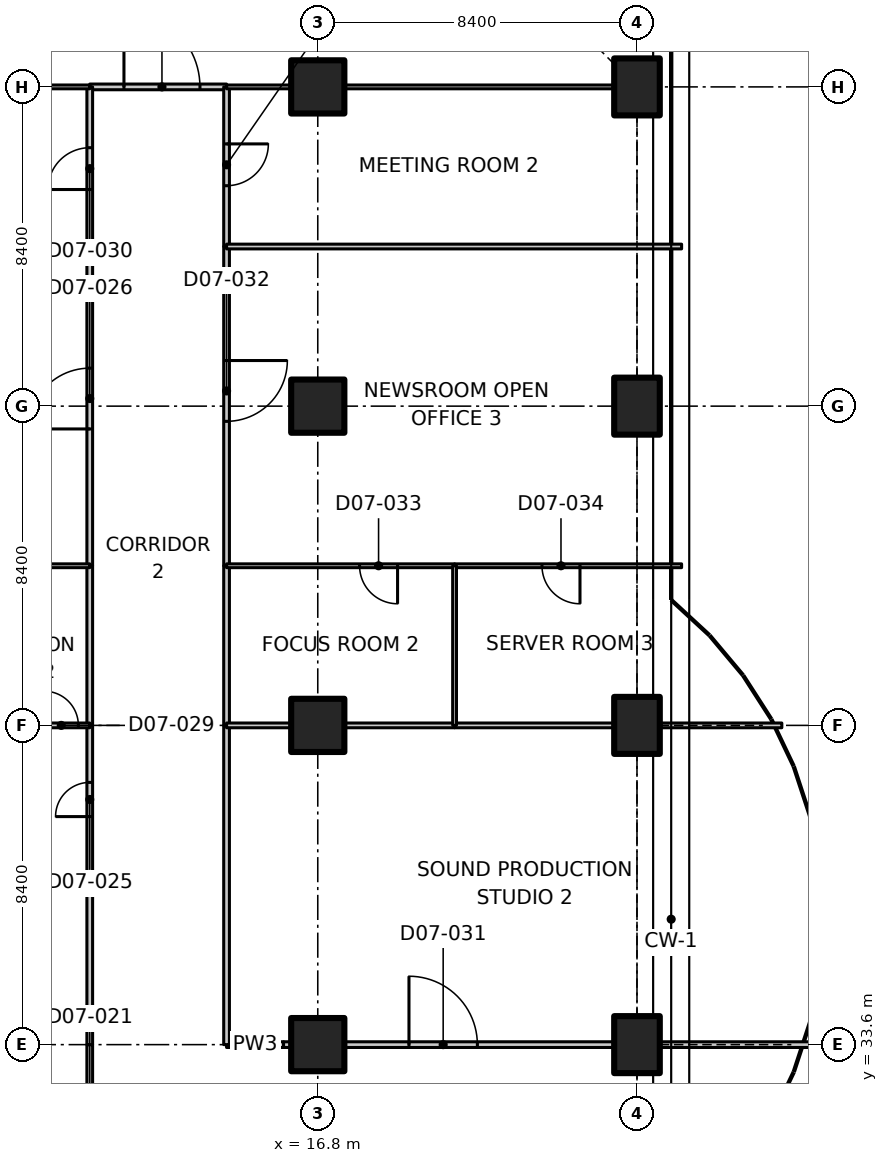
"""IFC4 building model, lengths in metres.
Left out: names, types, materials, properties, quantities, classifications, styles, units other than length and angle.
Written with IfcOpenShell. Run it as: python <this file> out.ifc"""

import sys

from ifc_helpers import new_model, si_unit, direction, frame, frame_2d, origin, origin_2d, place, context, subcontext, project, spatial, polyline, rectangle, outline, extrude, element, fill, save


model = new_model("IFC4")
c1 = context("Model", 3, precision=1e-05, world=origin(), true_north=direction((0.0, 1.0)))
c2 = subcontext(c1, "Body", "Model", "MODEL_VIEW")
j1 = project(units=[si_unit("LENGTHUNIT", "METRE"), si_unit("PLANEANGLEUNIT", "RADIAN")], contexts=[c1])
p1 = place(None, origin())
s1 = spatial("IfcSite", under=j1, at=p1, CompositionType="ELEMENT")
p2 = place(p1, origin())
s2 = spatial("IfcBuilding", under=s1, at=p2, CompositionType="ELEMENT")
p3 = place(p2, frame((0.0, 0.0, 43.7)))
s3 = spatial("IfcBuildingStorey", under=s2, at=p3, CompositionType="ELEMENT", Elevation=43.7)
for number, where, z_axis, x_axis in (
    (1, (16.8, 33.6, 0.0), (0.0, 0.0, 1.0), (1.0, 0.0, 0.0)),
    (2, (16.8, 42.0, 0.0), (0.0, 0.0, 1.0), (1.0, 0.0, 0.0)),
    (3, (16.8, 50.4, 0.0), (0.0, 0.0, 1.0), (1.0, 0.0, 0.0)),
    (4, (16.8, 58.8, 0.0), (0.0, 0.0, 1.0), (1.0, 0.0, 0.0)),
):
    element("IfcColumn", number, at=place(p3, frame(where, z_axis=z_axis, x_axis=x_axis)), inside=s3, PredefinedType="COLUMN", context=c2, shape_type="SweptSolid", body=[
        extrude(rectangle(XDim=1.4, YDim=1.4, at=origin_2d()), origin(), (0.0, 0.0, 1.0), 3.35),
    ])
for number, where, z_axis, x_axis in (
    (5, (25.2, 33.6, 0.0), (0.0, 0.0, 1.0), (1.0, 0.0, 0.0)),
    (6, (25.2, 42.0, 0.0), (0.0, 0.0, 1.0), (1.0, 0.0, 0.0)),
    (7, (25.2, 50.4, 0.0), (0.0, 0.0, 1.0), (1.0, 0.0, 0.0)),
    (8, (25.2, 58.8, 0.0), (0.0, 0.0, 1.0), (1.0, 0.0, 0.0)),
):
    element("IfcColumn", number, at=place(p3, frame(where, z_axis=z_axis, x_axis=x_axis)), inside=s3, PredefinedType="COLUMN", context=c2, shape_type="SweptSolid", body=[
        extrude(rectangle(XDim=1.2, YDim=1.5, at=origin_2d()), origin(), (0.0, 0.0, 1.0), 3.35),
    ])
p4 = place(p3, frame((10.8, 29.4, 0.0), z_axis=(0.0, 0.0, 1.0), x_axis=(0.0, 1.0, 0.0)))
e9 = element("IfcWall", 9, at=p4, inside=s3, PredefinedType="PARTITIONING", context=c2, shape_type="SweptSolid", body=[
    extrude(rectangle(XDim=4.2, YDim=0.15, at=frame_2d((2.1, 0.0))), origin(), (0.0, 0.0, 1.0), 3.33),
])
p5 = place(p4, frame((1.2, 0.0, 0.0)))
e10 = element("IfcOpeningElement", 10, at=p5, cuts=e9, PredefinedType="OPENING", context=c2, shape_type="SweptSolid", body=[
    extrude(rectangle(XDim=1.6, YDim=2.1, at=frame_2d((0.8, 1.05))), frame((0.0, 0.085, 0.0), z_axis=(0.0, -1.0, 0.0), x_axis=(1.0, 0.0, 0.0)), (0.0, 0.0, 1.0), 0.17),
])
p6 = place(p3, frame((14.4, 33.6, 0.0), z_axis=(0.0, 0.0, 1.0), x_axis=(1.0, 0.0, 0.0)))
e11 = element("IfcWall", 11, at=p6, inside=s3, PredefinedType="PARTITIONING", context=c2, shape_type="SweptSolid", body=[
    extrude(rectangle(XDim=1.5, YDim=0.15, at=frame_2d((0.75, 0.0))), origin(), (0.0, 0.0, 1.0), 3.33),
])
p7 = place(p3, frame((15.9, 33.6, 0.0), z_axis=(0.0, 0.0, 1.0), x_axis=(1.0, 0.0, 0.0)))
e12 = element("IfcWall", 12, at=p7, inside=s3, PredefinedType="PARTITIONING", context=c2, shape_type="SweptSolid", body=[
    extrude(rectangle(XDim=8.68, YDim=0.15, at=frame_2d((4.34, 0.0))), origin(), (0.0, 0.0, 1.0), 3.33),
])
p8 = place(p7, frame((3.3, 0.0, 0.0)))
e13 = element("IfcOpeningElement", 13, at=p8, cuts=e12, PredefinedType="OPENING", context=c2, shape_type="SweptSolid", body=[
    extrude(rectangle(XDim=1.8, YDim=2.1, at=frame_2d((0.9, 1.05))), frame((0.0, 0.085, 0.0), z_axis=(0.0, -1.0, 0.0), x_axis=(1.0, 0.0, 0.0)), (0.0, 0.0, 1.0), 0.17),
])
p9 = place(p3, frame((25.82, 33.6, 0.0), z_axis=(0.0, 0.0, 1.0), x_axis=(1.0, 0.0, 0.0)))
e14 = element("IfcWall", 14, at=p9, inside=s3, PredefinedType="PARTITIONING", context=c2, shape_type="SweptSolid", body=[
    extrude(rectangle(XDim=3.942, YDim=0.15, at=frame_2d((1.971, 0.0))), origin(), (0.0, 0.0, 1.0), 2.98),
])
p10 = place(p3, frame((10.8, 58.8, 0.0), z_axis=(0.0, 0.0, 1.0), x_axis=(1.0, 0.0, 0.0)))
e15 = element("IfcWall", 15, at=p10, inside=s3, PredefinedType="PARTITIONING", context=c2, shape_type="SweptSolid", body=[
    extrude(rectangle(XDim=3.6, YDim=0.15, at=frame_2d((1.8, 0.0))), origin(), (0.0, 0.0, 1.0), 3.33),
])
p11 = place(p10, frame((0.9, 0.0, 0.0)))
e16 = element("IfcOpeningElement", 16, at=p11, cuts=e15, PredefinedType="OPENING", context=c2, shape_type="SweptSolid", body=[
    extrude(rectangle(XDim=2.0, YDim=2.4, at=frame_2d((1.0, 1.2))), frame((0.0, 0.085, 0.0), z_axis=(0.0, -1.0, 0.0), x_axis=(1.0, 0.0, 0.0)), (0.0, 0.0, 1.0), 0.17),
])
p12 = place(p3, frame((10.8, 33.6, 0.0), z_axis=(0.0, 0.0, 1.0), x_axis=(0.0, 1.0, 0.0)))
e17 = element("IfcWall", 17, at=p12, inside=s3, PredefinedType="PARTITIONING", context=c2, shape_type="SweptSolid", body=[
    extrude(rectangle(XDim=4.2, YDim=0.15, at=frame_2d((2.1, 0.0))), origin(), (0.0, 0.0, 1.0), 3.33),
])
p13 = place(p3, frame((10.8, 37.8, 0.0), z_axis=(0.0, 0.0, 1.0), x_axis=(0.0, 1.0, 0.0)))
e18 = element("IfcWall", 18, at=p13, inside=s3, PredefinedType="PARTITIONING", context=c2, shape_type="SweptSolid", body=[
    extrude(rectangle(XDim=4.2, YDim=0.15, at=frame_2d((2.1, 0.0))), origin(), (0.0, 0.0, 1.0), 3.33),
])
p14 = place(p13, frame((1.8, 0.0, 0.0)))
e19 = element("IfcOpeningElement", 19, at=p14, cuts=e18, PredefinedType="OPENING", context=c2, shape_type="SweptSolid", body=[
    extrude(rectangle(XDim=0.9, YDim=2.1, at=frame_2d((0.45, 1.05))), frame((0.0, 0.085, 0.0), z_axis=(0.0, -1.0, 0.0), x_axis=(1.0, 0.0, 0.0)), (0.0, 0.0, 1.0), 0.17),
])
p15 = place(p3, frame((10.8, 46.2, 0.0), z_axis=(0.0, 0.0, 1.0), x_axis=(0.0, 1.0, 0.0)))
e20 = element("IfcWall", 20, at=p15, inside=s3, PredefinedType="PARTITIONING", context=c2, shape_type="SweptSolid", body=[
    extrude(rectangle(XDim=8.4, YDim=0.15, at=frame_2d((4.2, 0.0))), origin(), (0.0, 0.0, 1.0), 3.33),
])
p16 = place(p15, frame((3.6, 0.0, 0.0)))
e21 = element("IfcOpeningElement", 21, at=p16, cuts=e20, PredefinedType="OPENING", context=c2, shape_type="SweptSolid", body=[
    extrude(rectangle(XDim=1.6, YDim=2.1, at=frame_2d((0.8, 1.05))), frame((0.0, 0.085, 0.0), z_axis=(0.0, -1.0, 0.0), x_axis=(1.0, 0.0, 0.0)), (0.0, 0.0, 1.0), 0.17),
])
p17 = place(p3, frame((10.8, 42.0, 0.0), z_axis=(0.0, 0.0, 1.0), x_axis=(0.0, 1.0, 0.0)))
e22 = element("IfcWall", 22, at=p17, inside=s3, PredefinedType="PARTITIONING", context=c2, shape_type="SweptSolid", body=[
    extrude(rectangle(XDim=4.2, YDim=0.15, at=frame_2d((2.1, 0.0))), origin(), (0.0, 0.0, 1.0), 3.33),
])
p18 = place(p3, frame((10.8, 54.6, 0.0), z_axis=(0.0, 0.0, 1.0), x_axis=(0.0, 1.0, 0.0)))
e23 = element("IfcWall", 23, at=p18, inside=s3, PredefinedType="PARTITIONING", context=c2, shape_type="SweptSolid", body=[
    extrude(rectangle(XDim=4.2, YDim=0.15, at=frame_2d((2.1, 0.0))), origin(), (0.0, 0.0, 1.0), 3.33),
])
p19 = place(p18, frame((1.5, 0.0, 0.0)))
e24 = element("IfcOpeningElement", 24, at=p19, cuts=e23, PredefinedType="OPENING", context=c2, shape_type="SweptSolid", body=[
    extrude(rectangle(XDim=1.1, YDim=2.1, at=frame_2d((0.55, 1.05))), frame((0.0, 0.085, 0.0), z_axis=(0.0, -1.0, 0.0), x_axis=(1.0, 0.0, 0.0)), (0.0, 0.0, 1.0), 0.17),
])
p20 = place(p3, frame((14.4, 42.0, 0.0), z_axis=(0.0, 0.0, 1.0), x_axis=(0.0, -1.0, 0.0)))
e25 = element("IfcWall", 25, at=p20, inside=s3, PredefinedType="PARTITIONING", context=c2, shape_type="SweptSolid", body=[
    extrude(rectangle(XDim=8.4, YDim=0.15, at=frame_2d((4.2, 0.0))), origin(), (0.0, 0.0, 1.0), 3.33),
])
p21 = place(p3, frame((14.4, 54.6, 0.0), z_axis=(0.0, 0.0, 1.0), x_axis=(0.0, -1.0, 0.0)))
e26 = element("IfcWall", 26, at=p21, inside=s3, PredefinedType="PARTITIONING", context=c2, shape_type="SweptSolid", body=[
    extrude(rectangle(XDim=8.4, YDim=0.15, at=frame_2d((4.2, 0.0))), origin(), (0.0, 0.0, 1.0), 3.33),
])
p22 = place(p21, frame((3.0, 0.0, 0.0)))
e27 = element("IfcOpeningElement", 27, at=p22, cuts=e26, PredefinedType="OPENING", context=c2, shape_type="SweptSolid", body=[
    extrude(rectangle(XDim=1.6, YDim=2.1, at=frame_2d((0.8, 1.05))), frame((0.0, 0.085, 0.0), z_axis=(0.0, -1.0, 0.0), x_axis=(1.0, 0.0, 0.0)), (0.0, 0.0, 1.0), 0.17),
])
p23 = place(p3, frame((14.4, 46.2, 0.0), z_axis=(0.0, 0.0, 1.0), x_axis=(0.0, -1.0, 0.0)))
e28 = element("IfcWall", 28, at=p23, inside=s3, PredefinedType="PARTITIONING", context=c2, shape_type="SweptSolid", body=[
    extrude(rectangle(XDim=4.2, YDim=0.15, at=frame_2d((2.1, 0.0))), origin(), (0.0, 0.0, 1.0), 3.33),
])
p24 = place(p3, frame((14.4, 58.8, 0.0), z_axis=(0.0, 0.0, 1.0), x_axis=(0.0, -1.0, 0.0)))
e29 = element("IfcWall", 29, at=p24, inside=s3, PredefinedType="PARTITIONING", context=c2, shape_type="SweptSolid", body=[
    extrude(rectangle(XDim=4.2, YDim=0.15, at=frame_2d((2.1, 0.0))), origin(), (0.0, 0.0, 1.0), 3.33),
])
p25 = place(p24, frame((1.5, 0.0, 0.0)))
e30 = element("IfcOpeningElement", 30, at=p25, cuts=e29, PredefinedType="OPENING", context=c2, shape_type="SweptSolid", body=[
    extrude(rectangle(XDim=1.1, YDim=2.1, at=frame_2d((0.55, 1.05))), frame((0.0, 0.085, 0.0), z_axis=(0.0, -1.0, 0.0), x_axis=(1.0, 0.0, 0.0)), (0.0, 0.0, 1.0), 0.17),
])
p26 = place(p3, frame((10.8, 58.8, 0.0), z_axis=(0.0, 0.0, 1.0), x_axis=(-1.0, 0.0, 0.0)))
e31 = element("IfcWall", 31, at=p26, inside=s3, PredefinedType="PARTITIONING", context=c2, shape_type="SweptSolid", body=[
    extrude(rectangle(XDim=1.68, YDim=0.1, at=frame_2d((0.84, 0.0))), origin(), (0.0, 0.0, 1.0), 3.33),
])
p27 = place(p3, frame((24.58, 58.8, 0.0), z_axis=(0.0, 0.0, 1.0), x_axis=(-1.0, 0.0, 0.0)))
e32 = element("IfcWall", 32, at=p27, inside=s3, PredefinedType="PARTITIONING", context=c2, shape_type="SweptSolid", body=[
    extrude(rectangle(XDim=7.06, YDim=0.1, at=frame_2d((3.53, 0.0))), origin(), (0.0, 0.0, 1.0), 3.33),
])
p28 = place(p3, frame((16.08, 58.8, 0.0), z_axis=(0.0, 0.0, 1.0), x_axis=(-1.0, 0.0, 0.0)))
e33 = element("IfcWall", 33, at=p28, inside=s3, PredefinedType="PARTITIONING", context=c2, shape_type="SweptSolid", body=[
    extrude(rectangle(XDim=1.68, YDim=0.1, at=frame_2d((0.84, 0.0))), origin(), (0.0, 0.0, 1.0), 3.33),
])
p29 = place(p3, frame((-1.174, 37.8, 0.0), z_axis=(0.0, 0.0, 1.0), x_axis=(1.0, 0.0, 0.0)))
e34 = element("IfcWall", 34, at=p29, inside=s3, PredefinedType="PARTITIONING", context=c2, shape_type="SweptSolid", body=[
    extrude(outline(polyline([(0.0, 0.0), (11.974, 0.0), (11.974, 3.33), (1.624, 3.33), (1.622, 2.98), (0.726, 2.98), (0.724, 3.33), (0.074, 3.33), (0.0, 3.33), (0.0, 0.0)])), frame((0.0, 0.062, 0.0), z_axis=(0.0, -1.0, 0.0), x_axis=(1.0, 0.0, 0.0)), (0.0, 0.0, 1.0), 0.125),
])
p30 = place(p3, frame((6.6, 42.0, 0.0), z_axis=(0.0, 0.0, 1.0), x_axis=(1.0, 0.0, 0.0)))
e35 = element("IfcWall", 35, at=p30, inside=s3, PredefinedType="PARTITIONING", context=c2, shape_type="SweptSolid", body=[
    extrude(rectangle(XDim=4.2, YDim=0.125, at=frame_2d((2.1, 0.0))), origin(), (0.0, 0.0, 1.0), 3.33),
])
p31 = place(p30, frame((3.0, 0.0, 0.0)))
e36 = element("IfcOpeningElement", 36, at=p31, cuts=e35, PredefinedType="OPENING", context=c2, shape_type="SweptSolid", body=[
    extrude(rectangle(XDim=0.9, YDim=2.1, at=frame_2d((0.45, 1.05))), frame((0.0, 0.073, 0.0), z_axis=(0.0, -1.0, 0.0), x_axis=(1.0, 0.0, 0.0)), (0.0, 0.0, 1.0), 0.145),
])
p32 = place(p3, frame((10.8, 46.2, 0.0), z_axis=(0.0, 0.0, 1.0), x_axis=(-1.0, 0.0, 0.0)))
e37 = element("IfcWall", 37, at=p32, inside=s3, PredefinedType="PARTITIONING", context=c2, shape_type="SweptSolid", body=[
    extrude(rectangle(XDim=4.2, YDim=0.1, at=frame_2d((2.1, 0.0))), origin(), (0.0, 0.0, 1.0), 3.33),
])
p33 = place(p3, frame((-1.174, 54.6, 0.0), z_axis=(0.0, 0.0, 1.0), x_axis=(1.0, 0.0, 0.0)))
e38 = element("IfcWall", 38, at=p33, inside=s3, PredefinedType="PARTITIONING", context=c2, shape_type="SweptSolid", body=[
    extrude(outline(polyline([(0.0, 0.0), (11.974, 0.0), (11.974, 3.33), (1.624, 3.33), (1.622, 2.98), (0.726, 2.98), (0.724, 3.33), (0.074, 3.33), (0.0, 3.33), (0.0, 0.0)])), frame((0.0, 0.062, 0.0), z_axis=(0.0, -1.0, 0.0), x_axis=(1.0, 0.0, 0.0)), (0.0, 0.0, 1.0), 0.125),
])
p34 = place(p3, frame((14.4, 42.0, 0.0), z_axis=(0.0, 0.0, 1.0), x_axis=(1.0, 0.0, 0.0)))
e39 = element("IfcWall", 39, at=p34, inside=s3, PredefinedType="PARTITIONING", context=c2, shape_type="SweptSolid", body=[
    extrude(rectangle(XDim=6.0, YDim=0.125, at=frame_2d((3.0, 0.0))), origin(), (0.0, 0.0, 1.0), 3.33),
])
p35 = place(p3, frame((20.4, 42.0, 0.0), z_axis=(0.0, 0.0, 1.0), x_axis=(1.0, 0.0, 0.0)))
e40 = element("IfcWall", 40, at=p35, inside=s3, PredefinedType="PARTITIONING", context=c2, shape_type="SweptSolid", body=[
    extrude(rectangle(XDim=4.18, YDim=0.125, at=frame_2d((2.09, 0.0))), origin(), (0.0, 0.0, 1.0), 3.33),
])
p36 = place(p3, frame((25.82, 42.0, 0.0), z_axis=(0.0, 0.0, 1.0), x_axis=(1.0, 0.0, 0.0)))
e41 = element("IfcWall", 41, at=p36, inside=s3, PredefinedType="PARTITIONING", context=c2, shape_type="SweptSolid", body=[
    extrude(rectangle(XDim=3.191, YDim=0.125, at=frame_2d((1.596, 0.0))), origin(), (0.0, 0.0, 1.0), 2.98),
])
p37 = place(p3, frame((20.4, 46.2, 0.0), z_axis=(0.0, 0.0, 1.0), x_axis=(-1.0, 0.0, 0.0)))
e42 = element("IfcWall", 42, at=p37, inside=s3, PredefinedType="PARTITIONING", context=c2, shape_type="SweptSolid", body=[
    extrude(rectangle(XDim=6.0, YDim=0.1, at=frame_2d((3.0, 0.0))), origin(), (0.0, 0.0, 1.0), 3.33),
])
p38 = place(p37, frame((1.5, 0.0, 0.0)))
e43 = element("IfcOpeningElement", 43, at=p38, cuts=e42, PredefinedType="OPENING", context=c2, shape_type="SweptSolid", body=[
    extrude(rectangle(XDim=1.0, YDim=2.1, at=frame_2d((0.5, 1.05))), frame((0.0, 0.06, 0.0), z_axis=(0.0, -1.0, 0.0), x_axis=(1.0, 0.0, 0.0)), (0.0, 0.0, 1.0), 0.12),
])
p39 = place(p3, frame((26.374, 46.2, 0.0), z_axis=(0.0, 0.0, 1.0), x_axis=(-1.0, 0.0, 0.0)))
e44 = element("IfcWall", 44, at=p39, inside=s3, PredefinedType="PARTITIONING", context=c2, shape_type="SweptSolid", body=[
    extrude(outline(polyline([(0.0, 0.0), (5.974, 0.0), (5.974, 3.33), (1.624, 3.33), (1.622, 2.98), (0.726, 2.98), (0.724, 3.33), (0.074, 3.33), (0.0, 3.33), (0.0, 0.0)])), frame((0.0, 0.05, 0.0), z_axis=(0.0, -1.0, 0.0), x_axis=(1.0, 0.0, 0.0)), (0.0, 0.0, 1.0), 0.1),
])
p40 = place(p39, frame((2.674, 0.0, 0.0)))
e45 = element("IfcOpeningElement", 45, at=p40, cuts=e44, PredefinedType="OPENING", context=c2, shape_type="SweptSolid", body=[
    extrude(rectangle(XDim=1.0, YDim=2.1, at=frame_2d((0.5, 1.05))), frame((0.0, 0.06, 0.0), z_axis=(0.0, -1.0, 0.0), x_axis=(1.0, 0.0, 0.0)), (0.0, 0.0, 1.0), 0.12),
])
p41 = place(p3, frame((14.4, 54.6, 0.0), z_axis=(0.0, 0.0, 1.0), x_axis=(1.0, 0.0, 0.0)))
e46 = element("IfcWall", 46, at=p41, inside=s3, PredefinedType="PARTITIONING", context=c2, shape_type="SweptSolid", body=[
    extrude(outline(polyline([(0.0, 0.0), (11.974, 0.0), (11.974, 3.33), (11.9, 3.33), (11.25, 3.33), (11.248, 2.98), (10.352, 2.98), (10.35, 3.33), (0.0, 3.33), (0.0, 0.0)])), frame((0.0, 0.062, 0.0), z_axis=(0.0, -1.0, 0.0), x_axis=(1.0, 0.0, 0.0)), (0.0, 0.0, 1.0), 0.125),
])
p42 = place(p3, frame((20.4, 46.2, 0.0), z_axis=(0.0, 0.0, 1.0), x_axis=(0.0, -1.0, 0.0)))
e47 = element("IfcWall", 47, at=p42, inside=s3, PredefinedType="PARTITIONING", context=c2, shape_type="SweptSolid", body=[
    extrude(rectangle(XDim=4.2, YDim=0.1, at=frame_2d((2.1, 0.0))), origin(), (0.0, 0.0, 1.0), 3.33),
])
p43 = place(p11, origin())
e48 = element("IfcDoor", 48, at=p43, inside=s3, OperationType="DOUBLE_DOOR_SINGLE_SWING", PredefinedType="DOOR", context=c2, shape_type="SweptSolid", body=[
    extrude(rectangle(XDim=2.0, YDim=2.4, at=frame_2d((1.0, 1.2))), frame((0.0, 0.025, 0.0), z_axis=(0.0, -1.0, 0.0), x_axis=(1.0, 0.0, 0.0)), (0.0, 0.0, 1.0), 0.05),
])
fill(e16, e48)
p44 = place(p14, origin())
e49 = element("IfcDoor", 49, at=p44, inside=s3, OperationType="SINGLE_SWING_LEFT", PredefinedType="DOOR", context=c2, shape_type="SweptSolid", body=[
    extrude(rectangle(XDim=0.9, YDim=2.1, at=frame_2d((0.45, 1.05))), frame((0.0, 0.025, 0.0), z_axis=(0.0, -1.0, 0.0), x_axis=(1.0, 0.0, 0.0)), (0.0, 0.0, 1.0), 0.05),
])
fill(e19, e49)
p45 = place(p16, origin())
e50 = element("IfcDoor", 50, at=p45, inside=s3, OperationType="DOUBLE_DOOR_SINGLE_SWING", PredefinedType="DOOR", context=c2, shape_type="SweptSolid", body=[
    extrude(rectangle(XDim=1.6, YDim=2.1, at=frame_2d((0.8, 1.05))), frame((0.0, 0.025, 0.0), z_axis=(0.0, -1.0, 0.0), x_axis=(1.0, 0.0, 0.0)), (0.0, 0.0, 1.0), 0.05),
])
fill(e21, e50)
p46 = place(p31, origin())
e51 = element("IfcDoor", 51, at=p46, inside=s3, OperationType="SINGLE_SWING_RIGHT", PredefinedType="DOOR", context=c2, shape_type="SweptSolid", body=[
    extrude(rectangle(XDim=0.9, YDim=2.1, at=frame_2d((0.45, 1.05))), frame((0.0, 0.025, 0.0), z_axis=(0.0, -1.0, 0.0), x_axis=(1.0, 0.0, 0.0)), (0.0, 0.0, 1.0), 0.05),
])
fill(e36, e51)
p47 = place(p19, origin())
e52 = element("IfcDoor", 52, at=p47, inside=s3, OperationType="SINGLE_SWING_LEFT", PredefinedType="DOOR", context=c2, shape_type="SweptSolid", body=[
    extrude(rectangle(XDim=1.1, YDim=2.1, at=frame_2d((0.55, 1.05))), frame((0.0, 0.025, 0.0), z_axis=(0.0, -1.0, 0.0), x_axis=(1.0, 0.0, 0.0)), (0.0, 0.0, 1.0), 0.05),
])
fill(e24, e52)
p48 = place(p8, origin())
e53 = element("IfcDoor", 53, at=p48, inside=s3, OperationType="DOUBLE_DOOR_SINGLE_SWING", PredefinedType="DOOR", context=c2, shape_type="SweptSolid", body=[
    extrude(rectangle(XDim=1.8, YDim=2.1, at=frame_2d((0.9, 1.05))), frame((0.0, 0.025, 0.0), z_axis=(0.0, -1.0, 0.0), x_axis=(1.0, 0.0, 0.0)), (0.0, 0.0, 1.0), 0.05),
])
fill(e13, e53)
p49 = place(p22, origin())
e54 = element("IfcDoor", 54, at=p49, inside=s3, OperationType="DOUBLE_DOOR_SINGLE_SWING", PredefinedType="DOOR", context=c2, shape_type="SweptSolid", body=[
    extrude(rectangle(XDim=1.6, YDim=2.1, at=frame_2d((0.8, 1.05))), frame((0.0, 0.025, 0.0), z_axis=(0.0, -1.0, 0.0), x_axis=(1.0, 0.0, 0.0)), (0.0, 0.0, 1.0), 0.05),
])
fill(e27, e54)
p50 = place(p38, origin())
e55 = element("IfcDoor", 55, at=p50, inside=s3, OperationType="SINGLE_SWING_LEFT", PredefinedType="DOOR", context=c2, shape_type="SweptSolid", body=[
    extrude(rectangle(XDim=1.0, YDim=2.1, at=frame_2d((0.5, 1.05))), frame((0.0, 0.025, 0.0), z_axis=(0.0, -1.0, 0.0), x_axis=(1.0, 0.0, 0.0)), (0.0, 0.0, 1.0), 0.05),
])
fill(e43, e55)
p51 = place(p40, origin())
e56 = element("IfcDoor", 56, at=p51, inside=s3, OperationType="SINGLE_SWING_LEFT", PredefinedType="DOOR", context=c2, shape_type="SweptSolid", body=[
    extrude(rectangle(XDim=1.0, YDim=2.1, at=frame_2d((0.5, 1.05))), frame((0.0, 0.025, 0.0), z_axis=(0.0, -1.0, 0.0), x_axis=(1.0, 0.0, 0.0)), (0.0, 0.0, 1.0), 0.05),
])
fill(e45, e56)
p52 = place(p25, origin())
e57 = element("IfcDoor", 57, at=p52, inside=s3, OperationType="SINGLE_SWING_LEFT", PredefinedType="DOOR", context=c2, shape_type="SweptSolid", body=[
    extrude(rectangle(XDim=1.1, YDim=2.1, at=frame_2d((0.55, 1.05))), frame((0.0, 0.025, 0.0), z_axis=(0.0, -1.0, 0.0), x_axis=(1.0, 0.0, 0.0)), (0.0, 0.0, 1.0), 0.05),
])
fill(e30, e57)
save(model, sys.argv[1])
